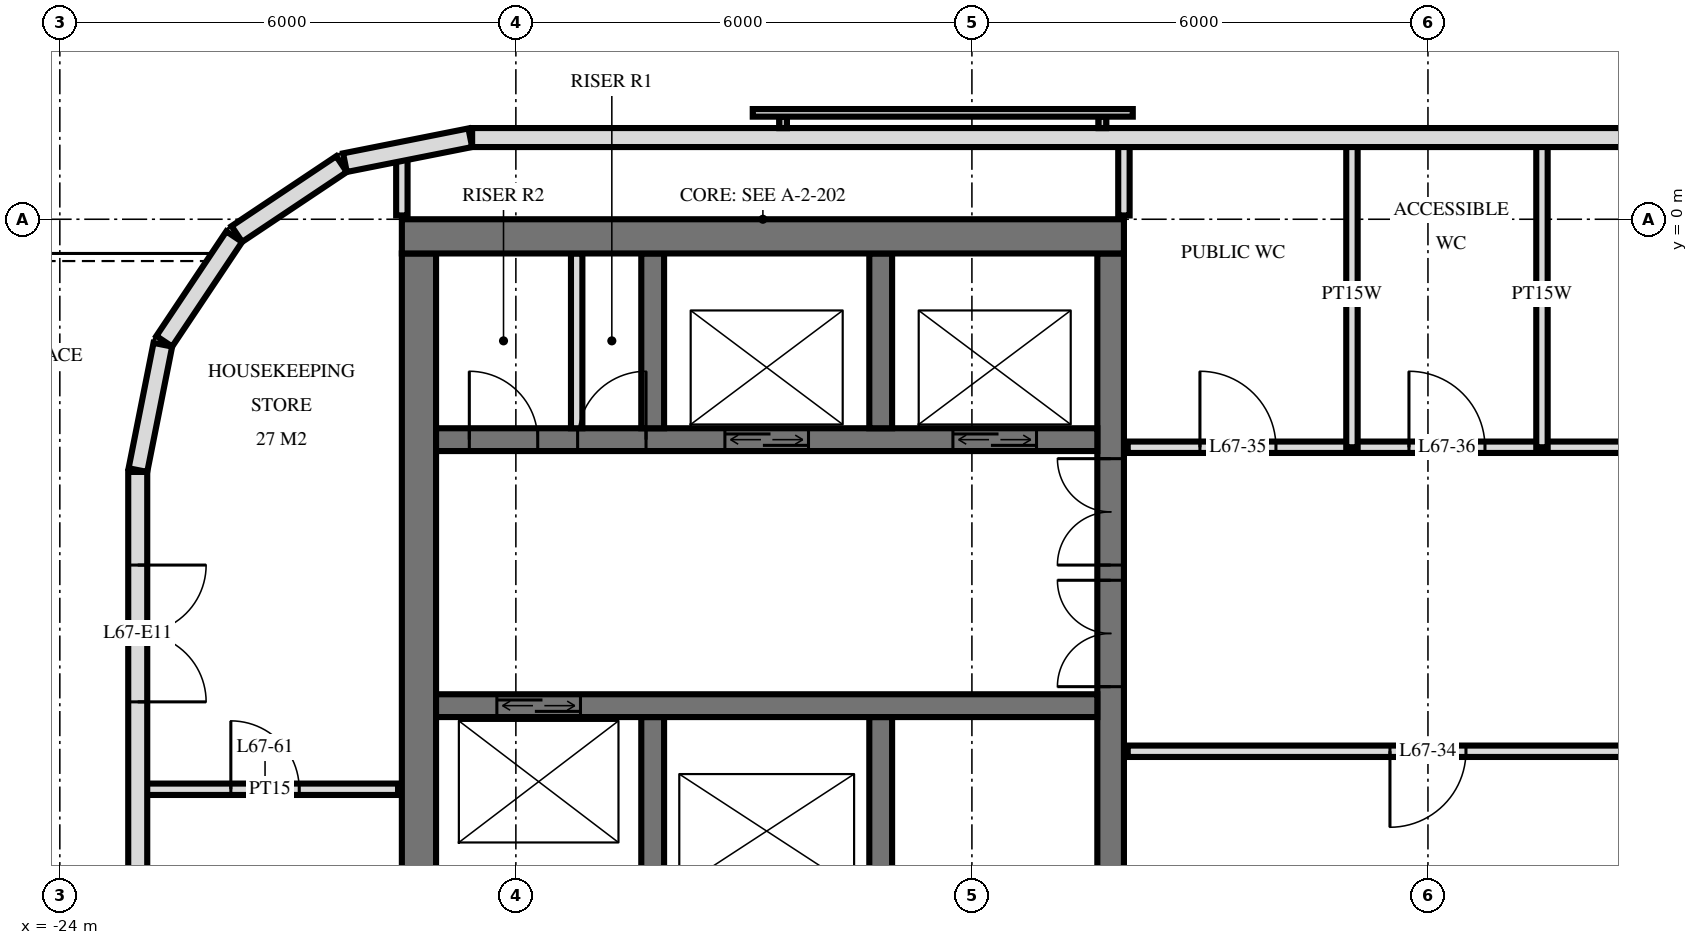
"""IFC4 building model, lengths in metres.
Left out: names, types, materials, properties, quantities, classifications, styles, units other than length and angle.
Written with IfcOpenShell. Run it as: python <this file> out.ifc"""

import sys

from ifc_helpers import new_model, si_unit, direction, frame, frame_2d, origin, place, context, subcontext, project, spatial, rectangle, extrude, element, fill, save


model = new_model("IFC4")
c1 = context("Model", 3, precision=1e-05, world=origin(), true_north=direction((0.0, 1.0)))
c2 = subcontext(c1, "Body", "Model", "MODEL_VIEW")
j1 = project(units=[si_unit("LENGTHUNIT", "METRE"), si_unit("PLANEANGLEUNIT", "RADIAN")], contexts=[c1])
p1 = place(None, origin())
s1 = spatial("IfcSite", under=j1, at=p1, CompositionType="ELEMENT")
p2 = place(p1, origin())
s2 = spatial("IfcBuilding", under=s1, at=p2, CompositionType="ELEMENT")
p3 = place(p2, frame((0.0, 0.0, 256.1)))
s3 = spatial("IfcBuildingStorey", under=s2, at=p3, CompositionType="ELEMENT", Elevation=256.1)
p4 = place(p3, frame((-19.5, -0.225, 0.0), z_axis=(0.0, 0.0, 1.0), x_axis=(1.0, 0.0, 0.0)))
e1 = element("IfcWall", 1, at=p4, inside=s3, PredefinedType="SHEAR", context=c2, shape_type="SweptSolid", body=[
    extrude(rectangle(XDim=9.5, YDim=0.45, at=frame_2d((4.75, 0.0))), origin(), (0.0, 0.0, 1.0), 3.5),
])
p5 = place(p3, frame((-10.175, -14.55, 0.0), z_axis=(0.0, 0.0, 1.0), x_axis=(0.0, 1.0, 0.0)))
e2 = element("IfcWall", 2, at=p5, inside=s3, PredefinedType="SHEAR", context=c2, shape_type="SweptSolid", body=[
    extrude(rectangle(XDim=14.1, YDim=0.35, at=frame_2d((7.05, 0.0))), origin(), (0.0, 0.0, 1.0), 3.5),
])
p6 = place(p5, frame((8.4, 0.0, 0.0)))
e3 = element("IfcOpeningElement", 3, at=p6, cuts=e2, PredefinedType="OPENING", context=c2, shape_type="SweptSolid", body=[
    extrude(rectangle(XDim=1.4, YDim=2.4, at=frame_2d((0.7, 1.2))), frame((0.0, 0.185, 0.0), z_axis=(0.0, -1.0, 0.0), x_axis=(1.0, 0.0, 0.0)), (0.0, 0.0, 1.0), 0.37),
])
p7 = place(p5, frame((10.0, 0.0, 0.0)))
e4 = element("IfcOpeningElement", 4, at=p7, cuts=e2, PredefinedType="OPENING", context=c2, shape_type="SweptSolid", body=[
    extrude(rectangle(XDim=1.4, YDim=2.4, at=frame_2d((0.7, 1.2))), frame((0.0, 0.185, 0.0), z_axis=(0.0, -1.0, 0.0), x_axis=(1.0, 0.0, 0.0)), (0.0, 0.0, 1.0), 0.37),
])
p8 = place(p5, frame((4.0, 0.0, 0.0)))
e5 = element("IfcOpeningElement", 5, at=p8, cuts=e2, PredefinedType="OPENING", context=c2, shape_type="SweptSolid", body=[
    extrude(rectangle(XDim=1.2, YDim=2.1, at=frame_2d((0.6, 1.05))), frame((0.0, 0.185, 0.0), z_axis=(0.0, -1.0, 0.0), x_axis=(1.0, 0.0, 0.0)), (0.0, 0.0, 1.0), 0.37),
])
p9 = place(p3, frame((-19.275, -14.55, 0.0), z_axis=(0.0, 0.0, 1.0), x_axis=(0.0, 1.0, 0.0)))
e6 = element("IfcWall", 6, at=p9, inside=s3, PredefinedType="SHEAR", context=c2, shape_type="SweptSolid", body=[
    extrude(rectangle(XDim=14.1, YDim=0.45, at=frame_2d((7.05, 0.0))), origin(), (0.0, 0.0, 1.0), 3.5),
])
p10 = place(p3, frame((-19.05, -2.9, 0.0), z_axis=(0.0, 0.0, 1.0), x_axis=(1.0, 0.0, 0.0)))
e7 = element("IfcWall", 7, at=p10, inside=s3, PredefinedType="SHEAR", context=c2, shape_type="SweptSolid", body=[
    extrude(rectangle(XDim=8.7, YDim=0.3, at=frame_2d((4.35, 0.0))), origin(), (0.0, 0.0, 1.0), 3.5),
])
p11 = place(p10, frame((6.8, 0.0, 0.0)))
e8 = element("IfcOpeningElement", 8, at=p11, cuts=e7, PredefinedType="OPENING", context=c2, shape_type="SweptSolid", body=[
    extrude(rectangle(XDim=1.1, YDim=2.1, at=frame_2d((0.55, 1.05))), frame((0.0, 0.16, 0.0), z_axis=(0.0, -1.0, 0.0), x_axis=(1.0, 0.0, 0.0)), (0.0, 0.0, 1.0), 0.32),
])
p12 = place(p10, frame((3.8, 0.0, 0.0)))
e9 = element("IfcOpeningElement", 9, at=p12, cuts=e7, PredefinedType="OPENING", context=c2, shape_type="SweptSolid", body=[
    extrude(rectangle(XDim=1.1, YDim=2.1, at=frame_2d((0.55, 1.05))), frame((0.0, 0.16, 0.0), z_axis=(0.0, -1.0, 0.0), x_axis=(1.0, 0.0, 0.0)), (0.0, 0.0, 1.0), 0.32),
])
p13 = place(p10, frame((1.863, 0.0, 0.0)))
e10 = element("IfcOpeningElement", 10, at=p13, cuts=e7, PredefinedType="OPENING", context=c2, shape_type="SweptSolid", body=[
    extrude(rectangle(XDim=0.9, YDim=2.1, at=frame_2d((0.45, 1.05))), frame((0.0, 0.16, 0.0), z_axis=(0.0, -1.0, 0.0), x_axis=(1.0, 0.0, 0.0)), (0.0, 0.0, 1.0), 0.32),
])
p14 = place(p10, frame((0.438, 0.0, 0.0)))
e11 = element("IfcOpeningElement", 11, at=p14, cuts=e7, PredefinedType="OPENING", context=c2, shape_type="SweptSolid", body=[
    extrude(rectangle(XDim=0.9, YDim=2.1, at=frame_2d((0.45, 1.05))), frame((0.0, 0.16, 0.0), z_axis=(0.0, -1.0, 0.0), x_axis=(1.0, 0.0, 0.0)), (0.0, 0.0, 1.0), 0.32),
])
p15 = place(p3, frame((-19.05, -6.4, 0.0), z_axis=(0.0, 0.0, 1.0), x_axis=(1.0, 0.0, 0.0)))
e12 = element("IfcWall", 12, at=p15, inside=s3, PredefinedType="SHEAR", context=c2, shape_type="SweptSolid", body=[
    extrude(rectangle(XDim=8.7, YDim=0.3, at=frame_2d((4.35, 0.0))), origin(), (0.0, 0.0, 1.0), 3.5),
])
p16 = place(p15, frame((0.8, 0.0, 0.0)))
e13 = element("IfcOpeningElement", 13, at=p16, cuts=e12, PredefinedType="OPENING", context=c2, shape_type="SweptSolid", body=[
    extrude(rectangle(XDim=1.1, YDim=2.1, at=frame_2d((0.55, 1.05))), frame((0.0, 0.16, 0.0), z_axis=(0.0, -1.0, 0.0), x_axis=(1.0, 0.0, 0.0)), (0.0, 0.0, 1.0), 0.32),
])
for number, where, z_axis, x_axis in (
    (14, (-13.2, -2.75, 0.0), (0.0, 0.0, 1.0), (0.0, 1.0, 0.0)),
    (15, (-13.2, -8.85, 0.0), (0.0, 0.0, 1.0), (0.0, 1.0, 0.0)),
    (16, (-16.2, -2.75, 0.0), (0.0, 0.0, 1.0), (0.0, 1.0, 0.0)),
    (17, (-16.2, -8.85, 0.0), (0.0, 0.0, 1.0), (0.0, 1.0, 0.0)),
):
    element("IfcWall", number, at=place(p3, frame(where, z_axis=z_axis, x_axis=x_axis)), inside=s3, PredefinedType="SHEAR", context=c2, shape_type="SweptSolid", body=[
        extrude(rectangle(XDim=2.3, YDim=0.3, at=frame_2d((1.15, 0.0))), origin(), (0.0, 0.0, 1.0), 3.5),
    ])
p17 = place(p3, frame((18.575, 1.075, 0.0), z_axis=(0.0, 0.0, 1.0), x_axis=(-1.0, 0.0, 0.0)))
e18 = element("IfcWall", 18, at=p17, inside=s3, PredefinedType="SOLIDWALL", context=c2, shape_type="SweptSolid", body=[
    extrude(rectangle(XDim=37.151, YDim=0.25, at=frame_2d((18.575, 0.0))), origin(), (0.0, 0.0, 1.0), 3.22),
])
p18 = place(p17, frame((9.275, 0.0, 0.9)))
e19 = element("IfcOpeningElement", 19, at=p18, cuts=e18, PredefinedType="OPENING", context=c2, shape_type="SweptSolid", body=[
    extrude(rectangle(XDim=2.4, YDim=1.5, at=frame_2d((1.2, 0.75))), frame((0.0, 0.135, 0.0), z_axis=(0.0, -1.0, 0.0), x_axis=(1.0, 0.0, 0.0)), (0.0, 0.0, 1.0), 0.27),
])
p19 = place(p17, frame((12.275, 0.0, 0.9)))
e20 = element("IfcOpeningElement", 20, at=p19, cuts=e18, PredefinedType="OPENING", context=c2, shape_type="SweptSolid", body=[
    extrude(rectangle(XDim=2.4, YDim=1.5, at=frame_2d((1.2, 0.75))), frame((0.0, 0.135, 0.0), z_axis=(0.0, -1.0, 0.0), x_axis=(1.0, 0.0, 0.0)), (0.0, 0.0, 1.0), 0.27),
])
p20 = place(p17, frame((18.275, 0.0, 0.9)))
e21 = element("IfcOpeningElement", 21, at=p20, cuts=e18, PredefinedType="OPENING", context=c2, shape_type="SweptSolid", body=[
    extrude(rectangle(XDim=2.4, YDim=1.5, at=frame_2d((1.2, 0.75))), frame((0.0, 0.135, 0.0), z_axis=(0.0, -1.0, 0.0), x_axis=(1.0, 0.0, 0.0)), (0.0, 0.0, 1.0), 0.27),
])
p21 = place(p3, frame((-18.6, 1.073, 0.0), z_axis=(0.0, 0.0, 1.0), x_axis=(-0.980797896849, -0.195026884138, 0.0)))
e22 = element("IfcWall", 22, at=p21, inside=s3, PredefinedType="SOLIDWALL", context=c2, shape_type="SweptSolid", body=[
    extrude(rectangle(XDim=1.681, YDim=0.25, at=frame_2d((0.841, 0.0))), origin(), (0.0, 0.0, 1.0), 3.22),
])
for number, where, z_axis, x_axis in (
    (23, (-20.294, 0.726, 0.0), (0.0, 0.0, 1.0), (-0.831, -0.556, 0.0)),
    (24, (-21.706, -0.229, 0.0), (0.0, 0.0, 1.0), (-0.556, -0.831, 0.0)),
):
    element("IfcWall", number, at=place(p3, frame(where, z_axis=z_axis, x_axis=x_axis)), inside=s3, PredefinedType="SOLIDWALL", context=c2, shape_type="SweptSolid", body=[
        extrude(rectangle(XDim=1.656, YDim=0.25, at=frame_2d((0.828, 0.0))), origin(), (0.0, 0.0, 1.0), 3.22),
    ])
p22 = place(p3, frame((-22.645, -1.651, 0.0), z_axis=(0.0, 0.0, 1.0), x_axis=(-0.19513878023, -0.980775640221, 0.0)))
e25 = element("IfcWall", 25, at=p22, inside=s3, PredefinedType="SOLIDWALL", context=c2, shape_type="SweptSolid", body=[
    extrude(rectangle(XDim=1.681, YDim=0.25, at=frame_2d((0.841, 0.0))), origin(), (0.0, 0.0, 1.0), 3.22),
])
p23 = place(p3, frame((-22.975, -3.325, 0.0), z_axis=(0.0, 0.0, 1.0), x_axis=(0.0, -1.0, 0.0)))
e26 = element("IfcWall", 26, at=p23, inside=s3, PredefinedType="SOLIDWALL", context=c2, shape_type="SweptSolid", body=[
    extrude(rectangle(XDim=25.951, YDim=0.25, at=frame_2d((12.975, 0.0))), origin(), (0.0, 0.0, 1.0), 3.22),
])
p24 = place(p23, frame((1.225, 0.0, 0.0)))
e27 = element("IfcOpeningElement", 27, at=p24, cuts=e26, PredefinedType="OPENING", context=c2, shape_type="SweptSolid", body=[
    extrude(rectangle(XDim=1.8, YDim=2.4, at=frame_2d((0.9, 1.2))), frame((0.0, 0.135, 0.0), z_axis=(0.0, -1.0, 0.0), x_axis=(1.0, 0.0, 0.0)), (0.0, 0.0, 1.0), 0.27),
])
p25 = place(p23, frame((7.975, 0.0, 0.0)))
e28 = element("IfcOpeningElement", 28, at=p25, cuts=e26, PredefinedType="OPENING", context=c2, shape_type="SweptSolid", body=[
    extrude(rectangle(XDim=1.8, YDim=2.4, at=frame_2d((0.9, 1.2))), frame((0.0, 0.135, 0.0), z_axis=(0.0, -1.0, 0.0), x_axis=(1.0, 0.0, 0.0)), (0.0, 0.0, 1.0), 0.27),
])
p26 = place(p23, frame((18.175, 0.0, 0.0)))
e29 = element("IfcOpeningElement", 29, at=p26, cuts=e26, PredefinedType="OPENING", context=c2, shape_type="SweptSolid", body=[
    extrude(rectangle(XDim=1.8, YDim=2.4, at=frame_2d((0.9, 1.2))), frame((0.0, 0.135, 0.0), z_axis=(0.0, -1.0, 0.0), x_axis=(1.0, 0.0, 0.0)), (0.0, 0.0, 1.0), 0.27),
])
p27 = place(p23, frame((21.075, 0.0, 0.0)))
e30 = element("IfcOpeningElement", 30, at=p27, cuts=e26, PredefinedType="OPENING", context=c2, shape_type="SweptSolid", body=[
    extrude(rectangle(XDim=1.8, YDim=2.4, at=frame_2d((0.9, 1.2))), frame((0.0, 0.135, 0.0), z_axis=(0.0, -1.0, 0.0), x_axis=(1.0, 0.0, 0.0)), (0.0, 0.0, 1.0), 0.27),
])
p28 = place(p23, frame((23.825, 0.0, 0.9)))
e31 = element("IfcOpeningElement", 31, at=p28, cuts=e26, PredefinedType="OPENING", context=c2, shape_type="SweptSolid", body=[
    extrude(rectangle(XDim=1.8, YDim=1.5, at=frame_2d((0.9, 0.75))), frame((0.0, 0.135, 0.0), z_axis=(0.0, -1.0, 0.0), x_axis=(1.0, 0.0, 0.0)), (0.0, 0.0, 1.0), 0.27),
])
p29 = place(p3, frame((-17.2, -2.75, 0.0), z_axis=(0.0, 0.0, 1.0), x_axis=(0.0, 1.0, 0.0)))
e32 = element("IfcWall", 32, at=p29, inside=s3, PredefinedType="PARTITIONING", context=c2, shape_type="SweptSolid", body=[
    extrude(rectangle(XDim=2.3, YDim=0.15, at=frame_2d((1.15, 0.0))), origin(), (0.0, 0.0, 1.0), 3.2),
])
for number, where, z_axis, x_axis in (
    (33, (-4.5, -3.0, 0.0), (0.0, 0.0, 1.0), (0.0, 1.0, 0.0)),
    (34, (-7.0, -3.0, 0.0), (0.0, 0.0, 1.0), (0.0, 1.0, 0.0)),
):
    element("IfcWall", number, at=place(p3, frame(where, z_axis=z_axis, x_axis=x_axis)), inside=s3, PredefinedType="PLUMBINGWALL", context=c2, shape_type="SweptSolid", body=[
        extrude(rectangle(XDim=4.02, YDim=0.15, at=frame_2d((2.01, 0.0))), origin(), (0.0, 0.0, 1.0), 3.22),
    ])
p30 = place(p3, frame((-10.0, 0.05, 0.0), z_axis=(0.0, 0.0, 1.0), x_axis=(0.0, 1.0, 0.0)))
e35 = element("IfcWall", 35, at=p30, inside=s3, PredefinedType="PLUMBINGWALL", context=c2, shape_type="SweptSolid", body=[
    extrude(rectangle(XDim=0.97, YDim=0.15, at=frame_2d((0.485, 0.0))), origin(), (0.0, 0.0, 1.0), 3.22),
])
p31 = place(p3, frame((-19.5, 0.05, 0.0), z_axis=(0.0, 0.0, 1.0), x_axis=(0.0, 1.0, 0.0)))
e36 = element("IfcWall", 36, at=p31, inside=s3, PredefinedType="PARTITIONING", context=c2, shape_type="SweptSolid", body=[
    extrude(rectangle(XDim=0.787, YDim=0.15, at=frame_2d((0.394, 0.0))), origin(), (0.0, 0.0, 1.0), 3.22),
])
p32 = place(p3, frame((-22.92, -7.5, 0.0), z_axis=(0.0, 0.0, 1.0), x_axis=(1.0, 0.0, 0.0)))
e37 = element("IfcWall", 37, at=p32, inside=s3, PredefinedType="PARTITIONING", context=c2, shape_type="SweptSolid", body=[
    extrude(rectangle(XDim=3.37, YDim=0.15, at=frame_2d((1.685, 0.0))), origin(), (0.0, 0.0, 1.0), 3.22),
])
p33 = place(p32, frame((1.17, 0.0, 0.0)))
e38 = element("IfcOpeningElement", 38, at=p33, cuts=e37, PredefinedType="OPENING", context=c2, shape_type="SweptSolid", body=[
    extrude(rectangle(XDim=0.9, YDim=2.1, at=frame_2d((0.45, 1.05))), frame((0.0, 0.085, 0.0), z_axis=(0.0, -1.0, 0.0), x_axis=(1.0, 0.0, 0.0)), (0.0, 0.0, 1.0), 0.17),
])
p34 = place(p3, frame((-9.95, -7.0, 0.0), z_axis=(0.0, 0.0, 1.0), x_axis=(1.0, 0.0, 0.0)))
e39 = element("IfcWall", 39, at=p34, inside=s3, PredefinedType="PARTITIONING", context=c2, shape_type="SweptSolid", body=[
    extrude(rectangle(XDim=19.9, YDim=0.15, at=frame_2d((9.95, 0.0))), origin(), (0.0, 0.0, 1.0), 3.22),
])
p35 = place(p34, frame((9.45, 0.0, 0.0)))
e40 = element("IfcOpeningElement", 40, at=p35, cuts=e39, PredefinedType="OPENING", context=c2, shape_type="SweptSolid", body=[
    extrude(rectangle(XDim=1.0, YDim=2.1, at=frame_2d((0.5, 1.05))), frame((0.0, 0.085, 0.0), z_axis=(0.0, -1.0, 0.0), x_axis=(1.0, 0.0, 0.0)), (0.0, 0.0, 1.0), 0.17),
])
p36 = place(p34, frame((3.45, 0.0, 0.0)))
e41 = element("IfcOpeningElement", 41, at=p36, cuts=e39, PredefinedType="OPENING", context=c2, shape_type="SweptSolid", body=[
    extrude(rectangle(XDim=1.0, YDim=2.1, at=frame_2d((0.5, 1.05))), frame((0.0, 0.085, 0.0), z_axis=(0.0, -1.0, 0.0), x_axis=(1.0, 0.0, 0.0)), (0.0, 0.0, 1.0), 0.17),
])
p37 = place(p3, frame((-9.95, -3.0, 0.0), z_axis=(0.0, 0.0, 1.0), x_axis=(1.0, 0.0, 0.0)))
e42 = element("IfcWall", 42, at=p37, inside=s3, PredefinedType="PARTITIONING", context=c2, shape_type="SweptSolid", body=[
    extrude(rectangle(XDim=19.9, YDim=0.15, at=frame_2d((9.95, 0.0))), origin(), (0.0, 0.0, 1.0), 3.22),
])
p38 = place(p37, frame((0.95, 0.0, 0.0)))
e43 = element("IfcOpeningElement", 43, at=p38, cuts=e42, PredefinedType="OPENING", context=c2, shape_type="SweptSolid", body=[
    extrude(rectangle(XDim=1.0, YDim=2.1, at=frame_2d((0.5, 1.05))), frame((0.0, 0.085, 0.0), z_axis=(0.0, -1.0, 0.0), x_axis=(1.0, 0.0, 0.0)), (0.0, 0.0, 1.0), 0.17),
])
p39 = place(p37, frame((3.7, 0.0, 0.0)))
e44 = element("IfcOpeningElement", 44, at=p39, cuts=e42, PredefinedType="OPENING", context=c2, shape_type="SweptSolid", body=[
    extrude(rectangle(XDim=1.0, YDim=2.1, at=frame_2d((0.5, 1.05))), frame((0.0, 0.085, 0.0), z_axis=(0.0, -1.0, 0.0), x_axis=(1.0, 0.0, 0.0)), (0.0, 0.0, 1.0), 0.17),
])
p40 = place(p37, frame((8.45, 0.0, 0.0)))
e45 = element("IfcOpeningElement", 45, at=p40, cuts=e42, PredefinedType="OPENING", context=c2, shape_type="SweptSolid", body=[
    extrude(rectangle(XDim=1.0, YDim=2.1, at=frame_2d((0.5, 1.05))), frame((0.0, 0.085, 0.0), z_axis=(0.0, -1.0, 0.0), x_axis=(1.0, 0.0, 0.0)), (0.0, 0.0, 1.0), 0.17),
])
p41 = place(p37, frame((15.7, 0.0, 0.0)))
e46 = element("IfcOpeningElement", 46, at=p41, cuts=e42, PredefinedType="OPENING", context=c2, shape_type="SweptSolid", body=[
    extrude(rectangle(XDim=1.0, YDim=2.1, at=frame_2d((0.5, 1.05))), frame((0.0, 0.085, 0.0), z_axis=(0.0, -1.0, 0.0), x_axis=(1.0, 0.0, 0.0)), (0.0, 0.0, 1.0), 0.17),
])
p42 = place(p24, origin())
e47 = element("IfcDoor", 47, at=p42, inside=s3, OperationType="DOUBLE_DOOR_SINGLE_SWING", PredefinedType="DOOR", context=c2, shape_type="SweptSolid", body=[
    extrude(rectangle(XDim=1.8, YDim=2.4, at=frame_2d((0.9, 1.2))), frame((0.0, 0.025, 0.0), z_axis=(0.0, -1.0, 0.0), x_axis=(1.0, 0.0, 0.0)), (0.0, 0.0, 1.0), 0.05),
])
fill(e27, e47)
p43 = place(p11, origin())
e48 = element("IfcDoor", 48, at=p43, inside=s3, OperationType="DOUBLE_DOOR_SLIDING", PredefinedType="USERDEFINED", context=c2, shape_type="SweptSolid", body=[
    extrude(rectangle(XDim=1.1, YDim=2.1, at=frame_2d((0.55, 1.05))), frame((0.0, 0.025, 0.0), z_axis=(0.0, -1.0, 0.0), x_axis=(1.0, 0.0, 0.0)), (0.0, 0.0, 1.0), 0.05),
])
fill(e8, e48)
p44 = place(p12, origin())
e49 = element("IfcDoor", 49, at=p44, inside=s3, OperationType="DOUBLE_DOOR_SLIDING", PredefinedType="USERDEFINED", context=c2, shape_type="SweptSolid", body=[
    extrude(rectangle(XDim=1.1, YDim=2.1, at=frame_2d((0.55, 1.05))), frame((0.0, 0.025, 0.0), z_axis=(0.0, -1.0, 0.0), x_axis=(1.0, 0.0, 0.0)), (0.0, 0.0, 1.0), 0.05),
])
fill(e9, e49)
p45 = place(p16, origin())
e50 = element("IfcDoor", 50, at=p45, inside=s3, OperationType="DOUBLE_DOOR_SLIDING", PredefinedType="USERDEFINED", context=c2, shape_type="SweptSolid", body=[
    extrude(rectangle(XDim=1.1, YDim=2.1, at=frame_2d((0.55, 1.05))), frame((0.0, 0.025, 0.0), z_axis=(0.0, -1.0, 0.0), x_axis=(1.0, 0.0, 0.0)), (0.0, 0.0, 1.0), 0.05),
])
fill(e13, e50)
p46 = place(p6, origin())
e51 = element("IfcDoor", 51, at=p46, inside=s3, OperationType="DOUBLE_DOOR_SINGLE_SWING", PredefinedType="DOOR", context=c2, shape_type="SweptSolid", body=[
    extrude(rectangle(XDim=1.4, YDim=2.4, at=frame_2d((0.7, 1.2))), frame((0.0, 0.025, 0.0), z_axis=(0.0, -1.0, 0.0), x_axis=(1.0, 0.0, 0.0)), (0.0, 0.0, 1.0), 0.05),
])
fill(e3, e51)
p47 = place(p7, origin())
e52 = element("IfcDoor", 52, at=p47, inside=s3, OperationType="DOUBLE_DOOR_SINGLE_SWING", PredefinedType="DOOR", context=c2, shape_type="SweptSolid", body=[
    extrude(rectangle(XDim=1.4, YDim=2.4, at=frame_2d((0.7, 1.2))), frame((0.0, 0.025, 0.0), z_axis=(0.0, -1.0, 0.0), x_axis=(1.0, 0.0, 0.0)), (0.0, 0.0, 1.0), 0.05),
])
fill(e4, e52)
p48 = place(p13, origin())
e53 = element("IfcDoor", 53, at=p48, inside=s3, OperationType="SINGLE_SWING_LEFT", PredefinedType="DOOR", context=c2, shape_type="SweptSolid", body=[
    extrude(rectangle(XDim=0.9, YDim=2.1, at=frame_2d((0.45, 1.05))), frame((0.0, 0.025, 0.0), z_axis=(0.0, -1.0, 0.0), x_axis=(1.0, 0.0, 0.0)), (0.0, 0.0, 1.0), 0.05),
])
fill(e10, e53)
p49 = place(p14, origin())
e54 = element("IfcDoor", 54, at=p49, inside=s3, OperationType="SINGLE_SWING_RIGHT", PredefinedType="DOOR", context=c2, shape_type="SweptSolid", body=[
    extrude(rectangle(XDim=0.9, YDim=2.1, at=frame_2d((0.45, 1.05))), frame((0.0, 0.025, 0.0), z_axis=(0.0, -1.0, 0.0), x_axis=(1.0, 0.0, 0.0)), (0.0, 0.0, 1.0), 0.05),
])
fill(e11, e54)
p50 = place(p36, frame((0.5, 0.0, 0.0), z_axis=(0.0, 0.0, 1.0), x_axis=(-1.0, 0.0, 0.0)))
e55 = element("IfcDoor", 55, at=p50, inside=s3, OperationType="SINGLE_SWING_LEFT", PredefinedType="DOOR", context=c2, shape_type="SweptSolid", body=[
    extrude(rectangle(XDim=1.0, YDim=2.1, at=frame_2d((0.0, 1.05))), frame((0.0, -0.025, 0.0), z_axis=(0.0, 1.0, 0.0), x_axis=(-1.0, 0.0, 0.0)), (0.0, 0.0, 1.0), 0.05),
])
fill(e41, e55)
p51 = place(p38, origin())
e56 = element("IfcDoor", 56, at=p51, inside=s3, OperationType="SINGLE_SWING_RIGHT", PredefinedType="DOOR", context=c2, shape_type="SweptSolid", body=[
    extrude(rectangle(XDim=1.0, YDim=2.1, at=frame_2d((0.5, 1.05))), frame((0.0, 0.025, 0.0), z_axis=(0.0, -1.0, 0.0), x_axis=(1.0, 0.0, 0.0)), (0.0, 0.0, 1.0), 0.05),
])
fill(e43, e56)
p52 = place(p39, origin())
e57 = element("IfcDoor", 57, at=p52, inside=s3, OperationType="SINGLE_SWING_RIGHT", PredefinedType="DOOR", context=c2, shape_type="SweptSolid", body=[
    extrude(rectangle(XDim=1.0, YDim=2.1, at=frame_2d((0.5, 1.05))), frame((0.0, 0.025, 0.0), z_axis=(0.0, -1.0, 0.0), x_axis=(1.0, 0.0, 0.0)), (0.0, 0.0, 1.0), 0.05),
])
fill(e44, e57)
p53 = place(p33, origin())
e58 = element("IfcDoor", 58, at=p53, inside=s3, OperationType="SINGLE_SWING_RIGHT", PredefinedType="DOOR", context=c2, shape_type="SweptSolid", body=[
    extrude(rectangle(XDim=0.9, YDim=2.1, at=frame_2d((0.45, 1.05))), frame((0.0, 0.025, 0.0), z_axis=(0.0, -1.0, 0.0), x_axis=(1.0, 0.0, 0.0)), (0.0, 0.0, 1.0), 0.05),
])
fill(e38, e58)
save(model, sys.argv[1])
